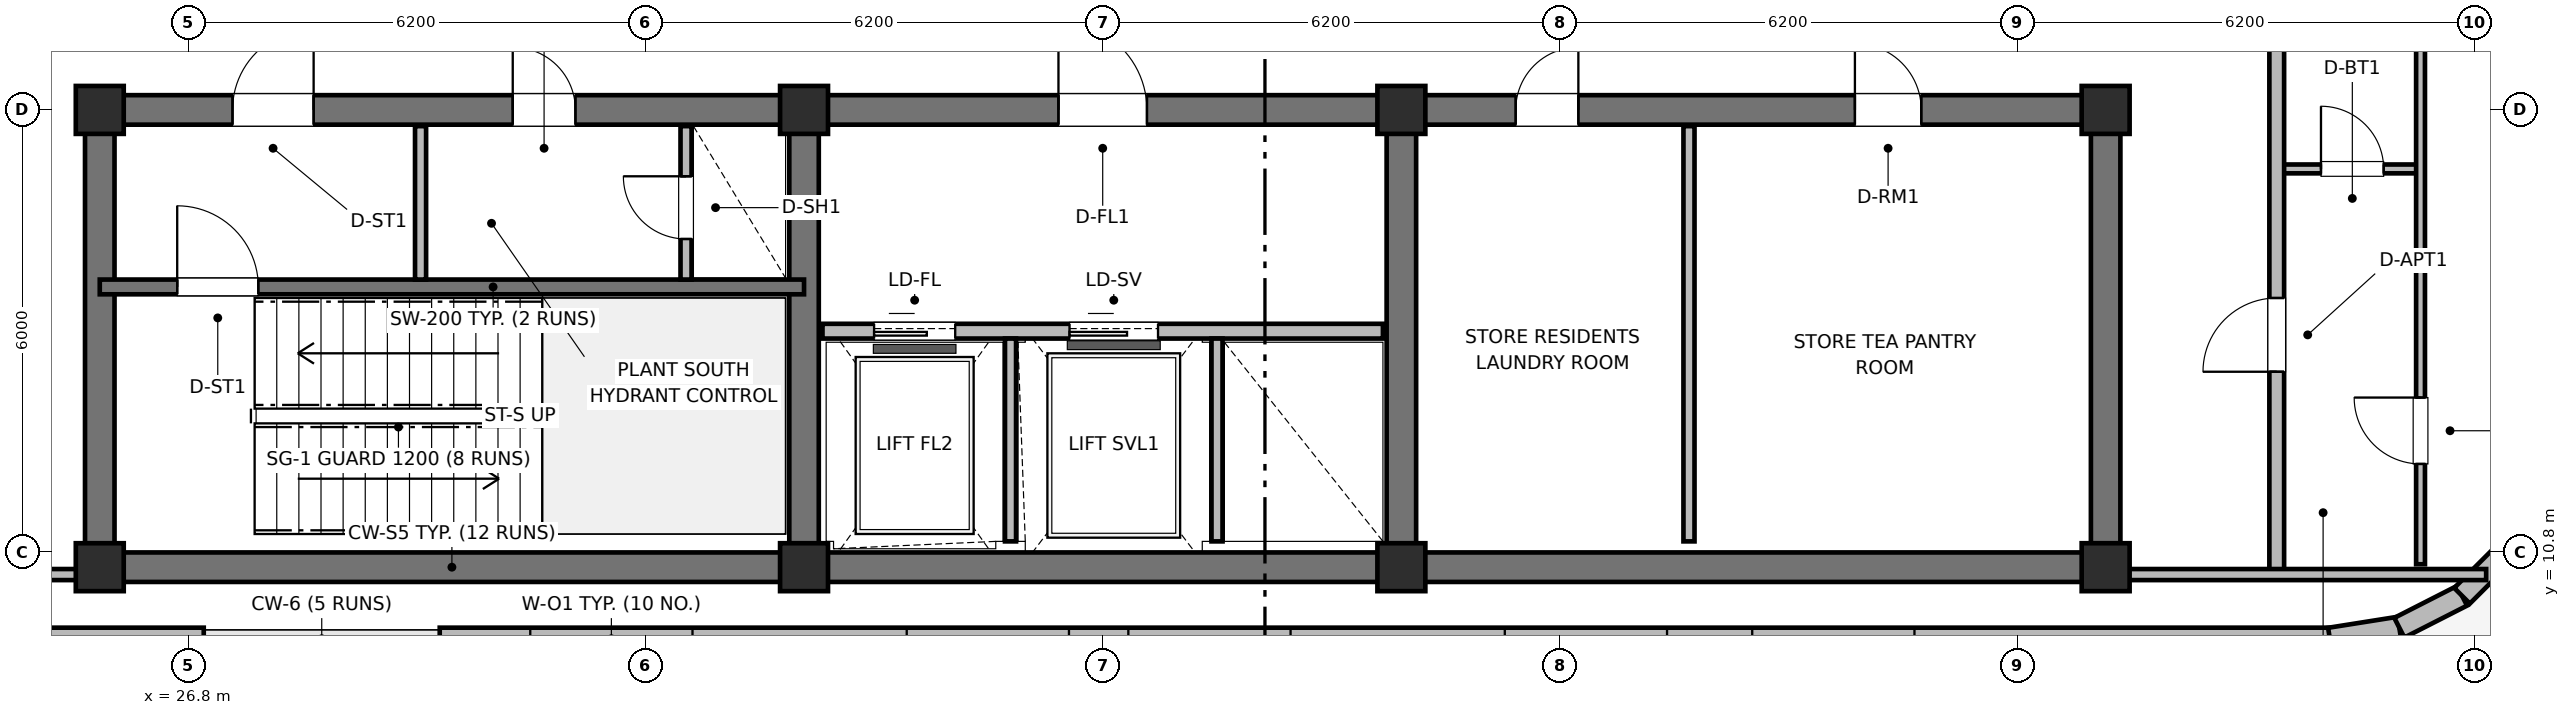
"""IFC4 building model, lengths in metres.
Left out: names, types, materials, properties, quantities, classifications, styles, units other than length and angle.
Written with IfcOpenShell. Run it as: python <this file> out.ifc"""

import sys

from ifc_helpers import new_model, si_unit, direction, frame, frame_2d, origin, origin_2d, place, context, subcontext, project, spatial, rectangle, extrude, element, fill, save


model = new_model("IFC4")
c1 = context("Model", 3, precision=1e-05, world=origin(), true_north=direction((0.0, 1.0)))
c2 = subcontext(c1, "Body", "Model", "MODEL_VIEW")
j1 = project(units=[si_unit("LENGTHUNIT", "METRE"), si_unit("PLANEANGLEUNIT", "RADIAN")], contexts=[c1])
p1 = place(None, origin())
s1 = spatial("IfcSite", under=j1, at=p1, CompositionType="ELEMENT")
p2 = place(p1, origin())
s2 = spatial("IfcBuilding", under=s1, at=p2, CompositionType="ELEMENT")
p3 = place(p2, frame((0.0, 0.0, 297.2)))
s3 = spatial("IfcBuildingStorey", under=s2, at=p3, CompositionType="ELEMENT", Elevation=297.2)
p4 = place(p3, frame((52.8, 10.6, 0.0), z_axis=(0.0, 0.0, 1.0), x_axis=(-1.0, 0.0, 0.0)))
e1 = element("IfcWall", 1, at=p4, inside=s3, PredefinedType="SHEAR", context=c2, shape_type="SweptSolid", body=[
    extrude(rectangle(XDim=27.2, YDim=0.4, at=frame_2d((13.6, 0.0))), origin(), (0.0, 0.0, 1.0), 4.8),
])
for number, where, z_axis, x_axis in (
    (2, (25.6, 10.8, 0.0), (0.0, 0.0, 1.0), (0.0, 1.0, 0.0)),
    (3, (52.8, 10.8, 0.0), (0.0, 0.0, 1.0), (0.0, 1.0, 0.0)),
):
    element("IfcWall", number, at=place(p3, frame(where, z_axis=z_axis, x_axis=x_axis)), inside=s3, PredefinedType="SHEAR", context=c2, shape_type="SweptSolid", body=[
        extrude(rectangle(XDim=5.8, YDim=0.4, at=frame_2d((2.9, 0.0))), origin(), (0.0, 0.0, 1.0), 4.8),
    ])
p5 = place(p3, frame((25.6, 16.8, 0.0), z_axis=(0.0, 0.0, 1.0), x_axis=(1.0, 0.0, 0.0)))
e4 = element("IfcWall", 4, at=p5, inside=s3, PredefinedType="SHEAR", context=c2, shape_type="SweptSolid", body=[
    extrude(rectangle(XDim=27.2, YDim=0.4, at=frame_2d((13.6, 0.0))), origin(), (0.0, 0.0, 1.0), 4.8),
])
p6 = place(p5, frame((1.8, 0.0, 0.0)))
e5 = element("IfcOpeningElement", 5, at=p6, cuts=e4, PredefinedType="OPENING", context=c2, shape_type="SweptSolid", body=[
    extrude(rectangle(XDim=1.1, YDim=2.15, at=frame_2d((0.55, 1.075))), frame((0.0, 0.21, 0.0), z_axis=(0.0, -1.0, 0.0), x_axis=(1.0, 0.0, 0.0)), (0.0, 0.0, 1.0), 0.42),
])
p7 = place(p5, frame((5.6, 0.0, 0.0)))
e6 = element("IfcOpeningElement", 6, at=p7, cuts=e4, PredefinedType="OPENING", context=c2, shape_type="SweptSolid", body=[
    extrude(rectangle(XDim=0.85, YDim=2.1, at=frame_2d((0.425, 1.05))), frame((0.0, 0.21, 0.0), z_axis=(0.0, -1.0, 0.0), x_axis=(1.0, 0.0, 0.0)), (0.0, 0.0, 1.0), 0.42),
])
p8 = place(p5, frame((13.0, 0.0, 0.0)))
e7 = element("IfcOpeningElement", 7, at=p8, cuts=e4, PredefinedType="OPENING", context=c2, shape_type="SweptSolid", body=[
    extrude(rectangle(XDim=1.2, YDim=2.15, at=frame_2d((0.6, 1.075))), frame((0.0, 0.21, 0.0), z_axis=(0.0, -1.0, 0.0), x_axis=(1.0, 0.0, 0.0)), (0.0, 0.0, 1.0), 0.42),
])
p9 = place(p5, frame((19.2, 0.0, 0.0)))
e8 = element("IfcOpeningElement", 8, at=p9, cuts=e4, PredefinedType="OPENING", context=c2, shape_type="SweptSolid", body=[
    extrude(rectangle(XDim=0.85, YDim=2.1, at=frame_2d((0.425, 1.05))), frame((0.0, 0.21, 0.0), z_axis=(0.0, -1.0, 0.0), x_axis=(1.0, 0.0, 0.0)), (0.0, 0.0, 1.0), 0.42),
])
p10 = place(p5, frame((23.8, 0.0, 0.0)))
e9 = element("IfcOpeningElement", 9, at=p10, cuts=e4, PredefinedType="OPENING", context=c2, shape_type="SweptSolid", body=[
    extrude(rectangle(XDim=0.9, YDim=2.1, at=frame_2d((0.45, 1.05))), frame((0.0, 0.21, 0.0), z_axis=(0.0, -1.0, 0.0), x_axis=(1.0, 0.0, 0.0)), (0.0, 0.0, 1.0), 0.42),
])
for number, where, z_axis, x_axis in (
    (10, (35.15, 10.8, 0.0), (0.0, 0.0, 1.0), (0.0, 1.0, 0.0)),
    (11, (43.25, 10.8, 0.0), (0.0, 0.0, 1.0), (0.0, 1.0, 0.0)),
):
    element("IfcWall", number, at=place(p3, frame(where, z_axis=z_axis, x_axis=x_axis)), inside=s3, PredefinedType="SHEAR", context=c2, shape_type="SweptSolid", body=[
        extrude(rectangle(XDim=5.8, YDim=0.4, at=frame_2d((2.9, 0.0))), origin(), (0.0, 0.0, 1.0), 4.8),
    ])
for number, where, z_axis, x_axis in (
    (12, (25.6, 10.6, 0.0), (0.0, 0.0, 1.0), (1.0, 0.0, 0.0)),
    (13, (25.6, 16.8, 0.0), (0.0, 0.0, 1.0), (1.0, 0.0, 0.0)),
    (14, (35.15, 10.6, 0.0), (0.0, 0.0, 1.0), (1.0, 0.0, 0.0)),
    (15, (35.15, 16.8, 0.0), (0.0, 0.0, 1.0), (1.0, 0.0, 0.0)),
    (16, (43.25, 10.6, 0.0), (0.0, 0.0, 1.0), (1.0, 0.0, 0.0)),
    (17, (43.25, 16.8, 0.0), (0.0, 0.0, 1.0), (1.0, 0.0, 0.0)),
    (18, (52.8, 10.6, 0.0), (0.0, 0.0, 1.0), (1.0, 0.0, 0.0)),
    (19, (52.8, 16.8, 0.0), (0.0, 0.0, 1.0), (1.0, 0.0, 0.0)),
):
    element("IfcColumn", number, at=place(p3, frame(where, z_axis=z_axis, x_axis=x_axis)), inside=s3, PredefinedType="COLUMN", context=c2, shape_type="SweptSolid", body=[
        extrude(rectangle(XDim=0.65, YDim=0.65, at=origin_2d()), origin(), (0.0, 0.0, 1.0), 4.8),
    ])
p11 = place(p3, frame((22.56, 9.63, 0.0), z_axis=(0.0, 0.0, 1.0), x_axis=(1.0, 0.0, 0.0)))
e20 = element("IfcWall", 20, at=p11, inside=s3, PredefinedType="SOLIDWALL", context=c2, shape_type="SweptSolid", body=[
    extrude(rectangle(XDim=4.45, YDim=0.3, at=frame_2d((2.225, 0.0))), origin(), (0.0, 0.0, 1.0), 2.6),
])
p12 = place(p3, frame((30.21, 9.63, 0.0), z_axis=(0.0, 0.0, 1.0), x_axis=(1.0, 0.0, 0.0)))
e21 = element("IfcWall", 21, at=p12, inside=s3, PredefinedType="SOLIDWALL", context=c2, shape_type="SweptSolid", body=[
    extrude(rectangle(XDim=25.63, YDim=0.3, at=frame_2d((12.815, 0.0))), origin(), (0.0, 0.0, 1.0), 2.6),
])
p13 = place(p12, frame((1.228, 0.0, 0.38)))
e22 = element("IfcOpeningElement", 22, at=p13, cuts=e21, PredefinedType="OPENING", context=c2, shape_type="SweptSolid", body=[
    extrude(rectangle(XDim=2.2, YDim=2.1, at=frame_2d((1.1, 1.05))), frame((0.0, 0.16, 0.0), z_axis=(0.0, -1.0, 0.0), x_axis=(1.0, 0.0, 0.0)), (0.0, 0.0, 1.0), 0.32),
])
p14 = place(p12, frame((6.333, 0.0, 0.38)))
e23 = element("IfcOpeningElement", 23, at=p14, cuts=e21, PredefinedType="OPENING", context=c2, shape_type="SweptSolid", body=[
    extrude(rectangle(XDim=2.2, YDim=2.1, at=frame_2d((1.1, 1.05))), frame((0.0, 0.16, 0.0), z_axis=(0.0, -1.0, 0.0), x_axis=(1.0, 0.0, 0.0)), (0.0, 0.0, 1.0), 0.32),
])
p15 = place(p12, frame((9.337, 0.0, 0.38)))
e24 = element("IfcOpeningElement", 24, at=p15, cuts=e21, PredefinedType="OPENING", context=c2, shape_type="SweptSolid", body=[
    extrude(rectangle(XDim=2.2, YDim=2.1, at=frame_2d((1.1, 1.05))), frame((0.0, 0.16, 0.0), z_axis=(0.0, -1.0, 0.0), x_axis=(1.0, 0.0, 0.0)), (0.0, 0.0, 1.0), 0.32),
])
p16 = place(p12, frame((14.442, 0.0, 0.38)))
e25 = element("IfcOpeningElement", 25, at=p16, cuts=e21, PredefinedType="OPENING", context=c2, shape_type="SweptSolid", body=[
    extrude(rectangle(XDim=2.2, YDim=2.1, at=frame_2d((1.1, 1.05))), frame((0.0, 0.16, 0.0), z_axis=(0.0, -1.0, 0.0), x_axis=(1.0, 0.0, 0.0)), (0.0, 0.0, 1.0), 0.32),
])
p17 = place(p12, frame((17.798, 0.0, 0.38)))
e26 = element("IfcOpeningElement", 26, at=p17, cuts=e21, PredefinedType="OPENING", context=c2, shape_type="SweptSolid", body=[
    extrude(rectangle(XDim=2.2, YDim=2.1, at=frame_2d((1.1, 1.05))), frame((0.0, 0.16, 0.0), z_axis=(0.0, -1.0, 0.0), x_axis=(1.0, 0.0, 0.0)), (0.0, 0.0, 1.0), 0.32),
])
p18 = place(p3, frame((55.84, 9.63, 0.0), z_axis=(0.0, 0.0, 1.0), x_axis=(0.987663181641, 0.156593229835, 0.0)))
e27 = element("IfcWall", 27, at=p18, inside=s3, PredefinedType="SOLIDWALL", context=c2, shape_type="SweptSolid", body=[
    extrude(rectangle(XDim=0.954, YDim=0.3, at=frame_2d((0.477, 0.0))), origin(), (0.0, 0.0, 1.0), 2.6),
])
for number, where, z_axis, x_axis in (
    (28, (56.782, 9.779, 0.0), (0.0, 0.0, 1.0), (0.891, 0.454, 0.0)),
    (29, (57.633, 10.212, 0.0), (0.0, 0.0, 1.0), (0.707, 0.707, 0.0)),
):
    element("IfcWall", number, at=place(p3, frame(where, z_axis=z_axis, x_axis=x_axis)), inside=s3, PredefinedType="SOLIDWALL", context=c2, shape_type="SweptSolid", body=[
        extrude(rectangle(XDim=0.954, YDim=0.3, at=frame_2d((0.477, 0.0))), origin(), (0.0, 0.0, 1.0), 2.6),
    ])
p19 = place(p3, frame((25.6, 14.4, 0.0), z_axis=(0.0, 0.0, 1.0), x_axis=(1.0, 0.0, 0.0)))
e30 = element("IfcWall", 30, at=p19, inside=s3, PredefinedType="SHEAR", context=c2, shape_type="SweptSolid", body=[
    extrude(rectangle(XDim=9.55, YDim=0.2, at=frame_2d((4.775, 0.0))), origin(), (0.0, 0.0, 1.0), 4.8),
])
p20 = place(p19, frame((1.05, 0.0, 0.0)))
e31 = element("IfcOpeningElement", 31, at=p20, cuts=e30, PredefinedType="OPENING", context=c2, shape_type="SweptSolid", body=[
    extrude(rectangle(XDim=1.1, YDim=2.15, at=frame_2d((0.55, 1.075))), frame((0.0, 0.11, 0.0), z_axis=(0.0, -1.0, 0.0), x_axis=(1.0, 0.0, 0.0)), (0.0, 0.0, 1.0), 0.22),
])
p21 = place(p3, frame((29.95, 14.5, 0.0), z_axis=(0.0, 0.0, 1.0), x_axis=(0.0, 1.0, 0.0)))
e32 = element("IfcWall", 32, at=p21, inside=s3, PredefinedType="PARTITIONING", context=c2, shape_type="SweptSolid", body=[
    extrude(rectangle(XDim=2.08, YDim=0.15, at=frame_2d((1.04, 0.0))), origin(), (0.0, 0.0, 1.0), 2.56),
])
p22 = place(p3, frame((33.55, 14.5, 0.0), z_axis=(0.0, 0.0, 1.0), x_axis=(0.0, 1.0, 0.0)))
e33 = element("IfcWall", 33, at=p22, inside=s3, PredefinedType="PARTITIONING", context=c2, shape_type="SweptSolid", body=[
    extrude(rectangle(XDim=2.08, YDim=0.15, at=frame_2d((1.04, 0.0))), origin(), (0.0, 0.0, 1.0), 2.56),
])
p23 = place(p22, frame((0.55, 0.0, 0.0)))
e34 = element("IfcOpeningElement", 34, at=p23, cuts=e33, PredefinedType="OPENING", context=c2, shape_type="SweptSolid", body=[
    extrude(rectangle(XDim=0.85, YDim=2.05, at=frame_2d((0.425, 1.025))), frame((0.0, 0.085, 0.0), z_axis=(0.0, -1.0, 0.0), x_axis=(1.0, 0.0, 0.0)), (0.0, 0.0, 1.0), 0.17),
])
p24 = place(p3, frame((35.4, 13.8, 0.0), z_axis=(0.0, 0.0, 1.0), x_axis=(1.0, 0.0, 0.0)))
e35 = element("IfcWall", 35, at=p24, inside=s3, PredefinedType="PARTITIONING", context=c2, shape_type="SweptSolid", body=[
    extrude(rectangle(XDim=7.6, YDim=0.2, at=frame_2d((3.8, 0.0))), origin(), (0.0, 0.0, 1.0), 2.56),
])
p25 = place(p24, frame((0.7, 0.0, 0.0)))
e36 = element("IfcOpeningElement", 36, at=p25, cuts=e35, PredefinedType="OPENING", context=c2, shape_type="SweptSolid", body=[
    extrude(rectangle(XDim=1.1, YDim=2.15, at=frame_2d((0.55, 1.075))), frame((0.0, 0.11, 0.0), z_axis=(0.0, -1.0, 0.0), x_axis=(1.0, 0.0, 0.0)), (0.0, 0.0, 1.0), 0.22),
])
p26 = place(p24, frame((3.35, 0.0, 0.0)))
e37 = element("IfcOpeningElement", 37, at=p26, cuts=e35, PredefinedType="OPENING", context=c2, shape_type="SweptSolid", body=[
    extrude(rectangle(XDim=1.2, YDim=2.15, at=frame_2d((0.6, 1.075))), frame((0.0, 0.11, 0.0), z_axis=(0.0, -1.0, 0.0), x_axis=(1.0, 0.0, 0.0)), (0.0, 0.0, 1.0), 0.22),
])
for number, where, z_axis, x_axis in (
    (38, (37.95, 10.95, 0.0), (0.0, 0.0, 1.0), (0.0, 1.0, 0.0)),
    (39, (40.75, 10.95, 0.0), (0.0, 0.0, 1.0), (0.0, 1.0, 0.0)),
):
    element("IfcWall", number, at=place(p3, frame(where, z_axis=z_axis, x_axis=x_axis)), inside=s3, PredefinedType="PARTITIONING", context=c2, shape_type="SweptSolid", body=[
        extrude(rectangle(XDim=2.75, YDim=0.15, at=frame_2d((1.375, 0.0))), origin(), (0.0, 0.0, 1.0), 2.56),
    ])
p27 = place(p3, frame((47.15, 10.95, 0.0), z_axis=(0.0, 0.0, 1.0), x_axis=(0.0, 1.0, 0.0)))
e40 = element("IfcWall", 40, at=p27, inside=s3, PredefinedType="PARTITIONING", context=c2, shape_type="SweptSolid", body=[
    extrude(rectangle(XDim=5.63, YDim=0.15, at=frame_2d((2.815, 0.0))), origin(), (0.0, 0.0, 1.0), 2.56),
])
p28 = place(p3, frame((55.12, 16.0, 0.0), z_axis=(0.0, 0.0, 1.0), x_axis=(1.0, 0.0, 0.0)))
e41 = element("IfcWall", 41, at=p28, inside=s3, PredefinedType="PARTITIONING", context=c2, shape_type="SweptSolid", body=[
    extrude(rectangle(XDim=1.95, YDim=0.12, at=frame_2d((0.975, 0.0))), origin(), (0.0, 0.0, 1.0), 2.56),
])
p29 = place(p28, frame((0.6, 0.0, 0.0)))
e42 = element("IfcOpeningElement", 42, at=p29, cuts=e41, PredefinedType="OPENING", context=c2, shape_type="SweptSolid", body=[
    extrude(rectangle(XDim=0.85, YDim=2.1, at=frame_2d((0.425, 1.05))), frame((0.0, 0.07, 0.0), z_axis=(0.0, -1.0, 0.0), x_axis=(1.0, 0.0, 0.0)), (0.0, 0.0, 1.0), 0.14),
])
p30 = place(p3, frame((57.07, 10.64, 0.0), z_axis=(0.0, 0.0, 1.0), x_axis=(0.0, 1.0, 0.0)))
e43 = element("IfcWall", 43, at=p30, inside=s3, PredefinedType="PARTITIONING", context=c2, shape_type="SweptSolid", body=[
    extrude(rectangle(XDim=35.12, YDim=0.12, at=frame_2d((17.56, 0.0))), origin(), (0.0, 0.0, 1.0), 2.56),
])
p31 = place(p30, frame((1.36, 0.0, 0.0)))
e44 = element("IfcOpeningElement", 44, at=p31, cuts=e43, PredefinedType="OPENING", context=c2, shape_type="SweptSolid", body=[
    extrude(rectangle(XDim=0.9, YDim=2.1, at=frame_2d((0.45, 1.05))), frame((0.0, 0.07, 0.0), z_axis=(0.0, -1.0, 0.0), x_axis=(1.0, 0.0, 0.0)), (0.0, 0.0, 1.0), 0.14),
])
p32 = place(p30, frame((15.235, 0.0, 0.0)))
e45 = element("IfcOpeningElement", 45, at=p32, cuts=e43, PredefinedType="OPENING", context=c2, shape_type="SweptSolid", body=[
    extrude(rectangle(XDim=0.82, YDim=2.08, at=frame_2d((0.41, 1.04))), frame((0.0, 0.07, 0.0), z_axis=(0.0, -1.0, 0.0), x_axis=(1.0, 0.0, 0.0)), (0.0, 0.0, 1.0), 0.14),
])
p33 = place(p3, frame((55.12, 10.5, 0.0), z_axis=(0.0, 0.0, 1.0), x_axis=(0.0, 1.0, 0.0)))
e46 = element("IfcWall", 46, at=p33, inside=s3, PredefinedType="PARTITIONING", context=c2, shape_type="SweptSolid", body=[
    extrude(rectangle(XDim=35.4, YDim=0.2, at=frame_2d((17.7, 0.0))), origin(), (0.0, 0.0, 1.0), 2.56),
])
p34 = place(p33, frame((2.75, 0.0, 0.0)))
e47 = element("IfcOpeningElement", 47, at=p34, cuts=e46, PredefinedType="OPENING", context=c2, shape_type="SweptSolid", body=[
    extrude(rectangle(XDim=1.0, YDim=2.15, at=frame_2d((0.5, 1.075))), frame((0.0, 0.11, 0.0), z_axis=(0.0, -1.0, 0.0), x_axis=(1.0, 0.0, 0.0)), (0.0, 0.0, 1.0), 0.22),
])
p35 = place(p3, frame((20.44, 10.5, 0.0), z_axis=(0.0, 0.0, 1.0), x_axis=(1.0, 0.0, 0.0)))
e48 = element("IfcWall", 48, at=p35, inside=s3, PredefinedType="PARTITIONING", context=c2, shape_type="SweptSolid", body=[
    extrude(rectangle(XDim=4.86, YDim=0.15, at=frame_2d((2.43, 0.0))), origin(), (0.0, 0.0, 1.0), 2.56),
])
p36 = place(p3, frame((53.1, 10.5, 0.0), z_axis=(0.0, 0.0, 1.0), x_axis=(1.0, 0.0, 0.0)))
e49 = element("IfcWall", 49, at=p36, inside=s3, PredefinedType="PARTITIONING", context=c2, shape_type="SweptSolid", body=[
    extrude(rectangle(XDim=4.86, YDim=0.15, at=frame_2d((2.43, 0.0))), origin(), (0.0, 0.0, 1.0), 2.56),
])
p37 = place(p20, origin())
e50 = element("IfcDoor", 50, at=p37, inside=s3, OperationType="SINGLE_SWING_LEFT", PredefinedType="DOOR", context=c2, shape_type="SweptSolid", body=[
    extrude(rectangle(XDim=1.1, YDim=2.15, at=frame_2d((0.55, 1.075))), frame((0.0, 0.025, 0.0), z_axis=(0.0, -1.0, 0.0), x_axis=(1.0, 0.0, 0.0)), (0.0, 0.0, 1.0), 0.05),
])
fill(e31, e50)
p38 = place(p23, origin())
e51 = element("IfcDoor", 51, at=p38, inside=s3, OperationType="SINGLE_SWING_RIGHT", PredefinedType="TRAPDOOR", context=c2, shape_type="SweptSolid", body=[
    extrude(rectangle(XDim=0.85, YDim=2.05, at=frame_2d((0.425, 1.025))), frame((0.0, 0.025, 0.0), z_axis=(0.0, -1.0, 0.0), x_axis=(1.0, 0.0, 0.0)), (0.0, 0.0, 1.0), 0.05),
])
fill(e34, e51)
p39 = place(p25, origin())
e52 = element("IfcDoor", 52, at=p39, inside=s3, OperationType="SLIDING_TO_LEFT", PredefinedType="DOOR", context=c2, shape_type="SweptSolid", body=[
    extrude(rectangle(XDim=1.1, YDim=2.15, at=frame_2d((0.55, 1.075))), frame((0.0, 0.025, 0.0), z_axis=(0.0, -1.0, 0.0), x_axis=(1.0, 0.0, 0.0)), (0.0, 0.0, 1.0), 0.05),
])
fill(e36, e52)
p40 = place(p26, origin())
e53 = element("IfcDoor", 53, at=p40, inside=s3, OperationType="SLIDING_TO_LEFT", PredefinedType="DOOR", context=c2, shape_type="SweptSolid", body=[
    extrude(rectangle(XDim=1.2, YDim=2.15, at=frame_2d((0.6, 1.075))), frame((0.0, 0.025, 0.0), z_axis=(0.0, -1.0, 0.0), x_axis=(1.0, 0.0, 0.0)), (0.0, 0.0, 1.0), 0.05),
])
fill(e37, e53)
p41 = place(p29, origin())
e54 = element("IfcDoor", 54, at=p41, inside=s3, OperationType="SINGLE_SWING_LEFT", PredefinedType="DOOR", context=c2, shape_type="SweptSolid", body=[
    extrude(rectangle(XDim=0.85, YDim=2.1, at=frame_2d((0.425, 1.05))), frame((0.0, 0.025, 0.0), z_axis=(0.0, -1.0, 0.0), x_axis=(1.0, 0.0, 0.0)), (0.0, 0.0, 1.0), 0.05),
])
fill(e42, e54)
p42 = place(p31, origin())
e55 = element("IfcDoor", 55, at=p42, inside=s3, OperationType="SINGLE_SWING_RIGHT", PredefinedType="DOOR", context=c2, shape_type="SweptSolid", body=[
    extrude(rectangle(XDim=0.9, YDim=2.1, at=frame_2d((0.45, 1.05))), frame((0.0, 0.025, 0.0), z_axis=(0.0, -1.0, 0.0), x_axis=(1.0, 0.0, 0.0)), (0.0, 0.0, 1.0), 0.05),
])
fill(e44, e55)
p43 = place(p34, origin())
e56 = element("IfcDoor", 56, at=p43, inside=s3, OperationType="SINGLE_SWING_LEFT", PredefinedType="DOOR", context=c2, shape_type="SweptSolid", body=[
    extrude(rectangle(XDim=1.0, YDim=2.15, at=frame_2d((0.5, 1.075))), frame((0.0, 0.025, 0.0), z_axis=(0.0, -1.0, 0.0), x_axis=(1.0, 0.0, 0.0)), (0.0, 0.0, 1.0), 0.05),
])
fill(e47, e56)
p44 = place(p6, origin())
e57 = element("IfcDoor", 57, at=p44, inside=s3, OperationType="SINGLE_SWING_RIGHT", PredefinedType="DOOR", context=c2, shape_type="SweptSolid", body=[
    extrude(rectangle(XDim=1.1, YDim=2.15, at=frame_2d((0.55, 1.075))), frame((0.0, 0.025, 0.0), z_axis=(0.0, -1.0, 0.0), x_axis=(1.0, 0.0, 0.0)), (0.0, 0.0, 1.0), 0.05),
])
fill(e5, e57)
p45 = place(p7, origin())
e58 = element("IfcDoor", 58, at=p45, inside=s3, OperationType="SINGLE_SWING_LEFT", PredefinedType="DOOR", context=c2, shape_type="SweptSolid", body=[
    extrude(rectangle(XDim=0.85, YDim=2.1, at=frame_2d((0.425, 1.05))), frame((0.0, 0.025, 0.0), z_axis=(0.0, -1.0, 0.0), x_axis=(1.0, 0.0, 0.0)), (0.0, 0.0, 1.0), 0.05),
])
fill(e6, e58)
p46 = place(p8, origin())
e59 = element("IfcDoor", 59, at=p46, inside=s3, OperationType="SINGLE_SWING_LEFT", PredefinedType="DOOR", context=c2, shape_type="SweptSolid", body=[
    extrude(rectangle(XDim=1.2, YDim=2.15, at=frame_2d((0.6, 1.075))), frame((0.0, 0.025, 0.0), z_axis=(0.0, -1.0, 0.0), x_axis=(1.0, 0.0, 0.0)), (0.0, 0.0, 1.0), 0.05),
])
fill(e7, e59)
p47 = place(p9, origin())
e60 = element("IfcDoor", 60, at=p47, inside=s3, OperationType="SINGLE_SWING_RIGHT", PredefinedType="DOOR", context=c2, shape_type="SweptSolid", body=[
    extrude(rectangle(XDim=0.85, YDim=2.1, at=frame_2d((0.425, 1.05))), frame((0.0, 0.025, 0.0), z_axis=(0.0, -1.0, 0.0), x_axis=(1.0, 0.0, 0.0)), (0.0, 0.0, 1.0), 0.05),
])
fill(e8, e60)
p48 = place(p10, origin())
e61 = element("IfcDoor", 61, at=p48, inside=s3, OperationType="SINGLE_SWING_LEFT", PredefinedType="DOOR", context=c2, shape_type="SweptSolid", body=[
    extrude(rectangle(XDim=0.9, YDim=2.1, at=frame_2d((0.45, 1.05))), frame((0.0, 0.025, 0.0), z_axis=(0.0, -1.0, 0.0), x_axis=(1.0, 0.0, 0.0)), (0.0, 0.0, 1.0), 0.05),
])
fill(e9, e61)
save(model, sys.argv[1])
